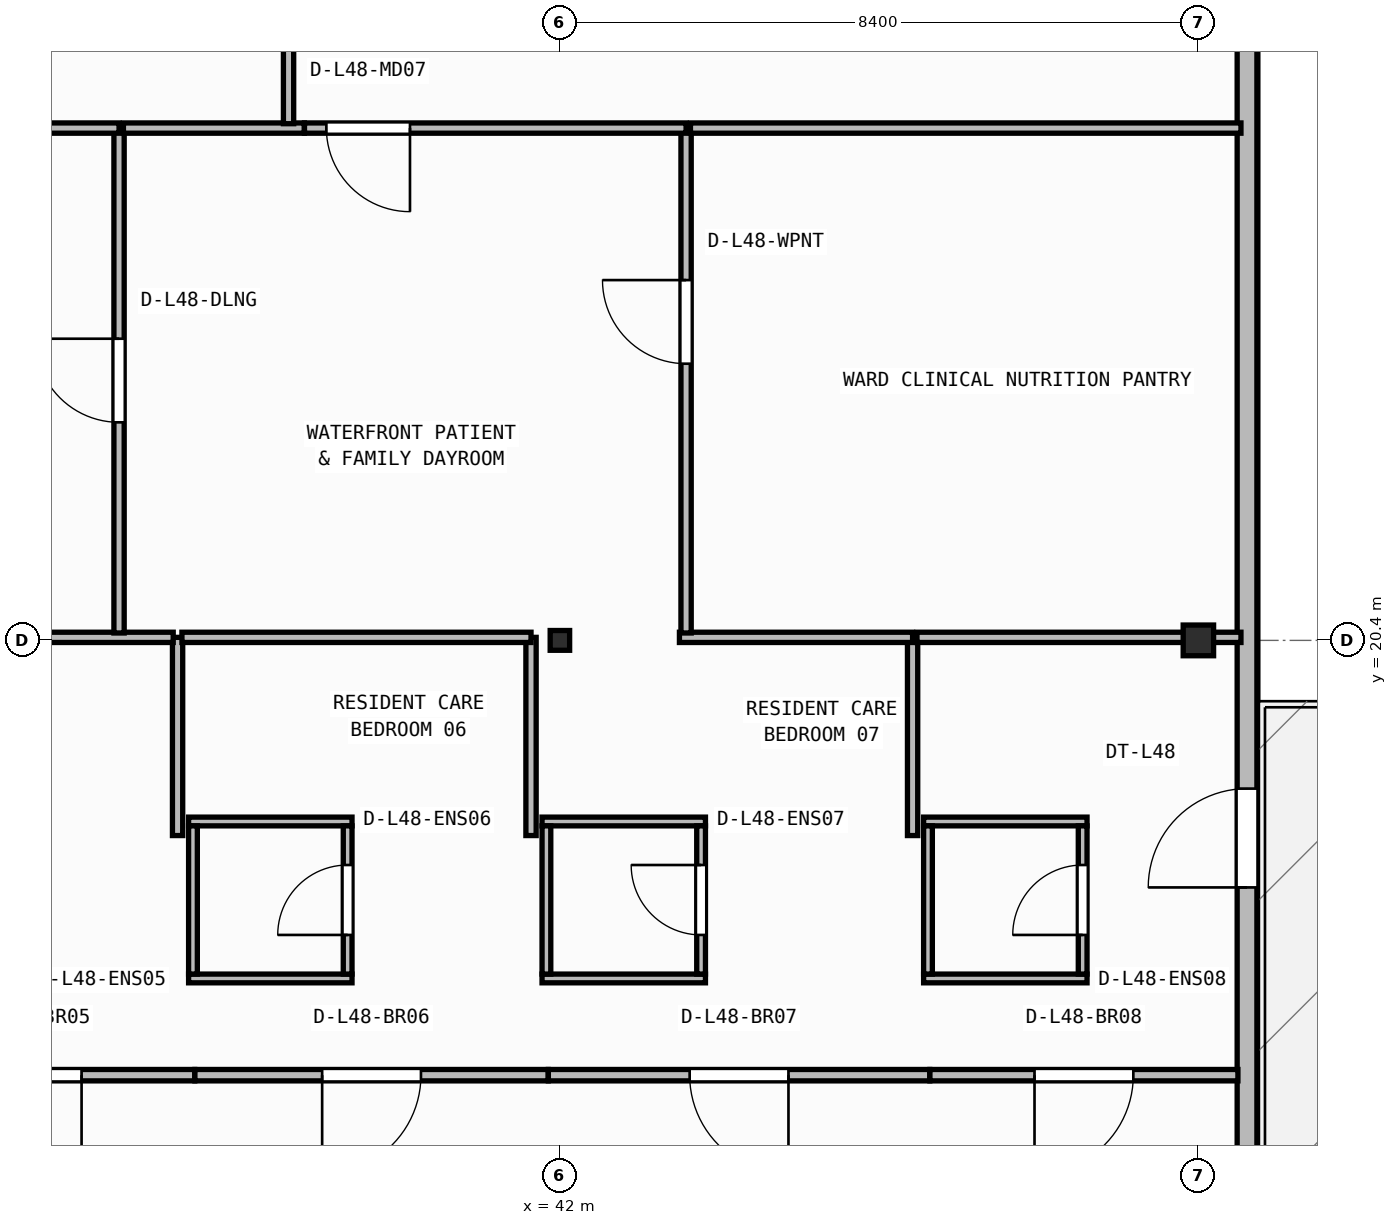
"""IFC4 building model, lengths in metres.
Left out: names, types, materials, properties, quantities, classifications, styles, units other than length and angle.
Written with IfcOpenShell. Run it as: python <this file> out.ifc"""

import sys

from ifc_helpers import new_model, si_unit, direction, frame, frame_2d, origin, origin_2d, place, context, subcontext, project, spatial, rectangle, i_section, extrude, element, fill, save


model = new_model("IFC4")
c1 = context("Model", 3, precision=1e-05, world=origin(), true_north=direction((0.0, 1.0)))
c2 = subcontext(c1, "Body", "Model", "MODEL_VIEW")
j1 = project(units=[si_unit("LENGTHUNIT", "METRE"), si_unit("PLANEANGLEUNIT", "RADIAN")], contexts=[c1])
p1 = place(None, origin())
s1 = spatial("IfcSite", under=j1, at=p1, CompositionType="ELEMENT")
p2 = place(p1, origin())
s2 = spatial("IfcBuilding", under=s1, at=p2, CompositionType="ELEMENT")
p3 = place(p2, frame((0.0, 0.0, 196.05)))
s3 = spatial("IfcBuildingStorey", under=s2, at=p3, CompositionType="ELEMENT", Elevation=196.05)
p4 = place(p3, frame((42.0, 20.4, 0.0), z_axis=(0.0, 0.0, 1.0), x_axis=(1.0, 0.0, 0.0)))
e1 = element("IfcColumn", 1, at=p4, inside=s3, PredefinedType="COLUMN", context=c2, shape_type="SweptSolid", body=[
    extrude(i_section(OverallWidth=0.256, OverallDepth=0.26, WebThickness=0.01, FlangeThickness=0.017, FilletRadius=0.013, at=origin_2d()), origin(), (0.0, 0.0, 1.0), 3.95),
])
p5 = place(p3, frame((50.4, 20.4, 0.0), z_axis=(0.0, 0.0, 1.0), x_axis=(1.0, 0.0, 0.0)))
e2 = element("IfcColumn", 2, at=p5, inside=s3, PredefinedType="COLUMN", context=c2, shape_type="SweptSolid", body=[
    extrude(i_section(OverallWidth=0.4, OverallDepth=0.404, WebThickness=0.02, FlangeThickness=0.032, at=origin_2d()), origin(), (0.0, 0.0, 1.0), 3.95),
])
p6 = place(p3, frame((51.04, 6.46, 0.0), z_axis=(0.0, 0.0, 1.0), x_axis=(0.0, 1.0, 0.0)))
e3 = element("IfcWall", 3, at=p6, inside=s3, PredefinedType="STANDARD", context=c2, shape_type="SweptSolid", body=[
    extrude(rectangle(XDim=22.68, YDim=0.26, at=frame_2d((11.34, 0.0))), origin(), (0.0, 0.0, 1.0), 3.71),
])
p7 = place(p6, frame((10.69, 0.0, 0.0)))
e4 = element("IfcOpeningElement", 4, at=p7, cuts=e3, PredefinedType="OPENING", context=c2, shape_type="SweptSolid", body=[
    extrude(rectangle(XDim=1.3, YDim=2.15, at=frame_2d((0.65, 1.075))), frame((0.0, 0.14, 0.0), z_axis=(0.0, -1.0, 0.0), x_axis=(1.0, 0.0, 0.0)), (0.0, 0.0, 1.0), 0.28),
])
p8 = place(p3, frame((37.115, 15.952, 0.0), z_axis=(0.0, 0.0, 1.0), x_axis=(1.0, 0.0, 0.0)))
e5 = element("IfcWall", 5, at=p8, inside=s3, PredefinedType="PARTITIONING", context=c2, shape_type="SweptSolid", body=[
    extrude(rectangle(XDim=2.15, YDim=0.115, at=frame_2d((1.075, 0.0))), origin(), (0.0, 0.0, 1.0), 3.478),
])
p9 = place(p3, frame((37.115, 18.018, 0.0), z_axis=(0.0, 0.0, 1.0), x_axis=(1.0, 0.0, 0.0)))
e6 = element("IfcWall", 6, at=p9, inside=s3, PredefinedType="PARTITIONING", context=c2, shape_type="SweptSolid", body=[
    extrude(rectangle(XDim=2.15, YDim=0.115, at=frame_2d((1.075, 0.0))), origin(), (0.0, 0.0, 1.0), 3.71),
])
p10 = place(p3, frame((37.173, 16.01, 0.0), z_axis=(0.0, 0.0, 1.0), x_axis=(0.0, 1.0, 0.0)))
e7 = element("IfcWall", 7, at=p10, inside=s3, PredefinedType="PARTITIONING", context=c2, shape_type="SweptSolid", body=[
    extrude(rectangle(XDim=1.95, YDim=0.115, at=frame_2d((0.975, 0.0))), origin(), (0.0, 0.0, 1.0), 3.71),
])
p11 = place(p3, frame((39.208, 16.01, 0.0), z_axis=(0.0, 0.0, 1.0), x_axis=(0.0, 1.0, 0.0)))
e8 = element("IfcWall", 8, at=p11, inside=s3, PredefinedType="PARTITIONING", context=c2, shape_type="SweptSolid", body=[
    extrude(rectangle(XDim=1.95, YDim=0.115, at=frame_2d((0.975, 0.0))), origin(), (0.0, 0.0, 1.0), 3.71),
])
p12 = place(p11, frame((0.515, 0.0, 0.0)))
e9 = element("IfcOpeningElement", 9, at=p12, cuts=e8, PredefinedType="OPENING", context=c2, shape_type="SweptSolid", body=[
    extrude(rectangle(XDim=0.92, YDim=2.1, at=frame_2d((0.46, 1.05))), frame((0.0, 0.067, 0.0), z_axis=(0.0, -1.0, 0.0), x_axis=(1.0, 0.0, 0.0)), (0.0, 0.0, 1.0), 0.135),
])
p13 = place(p3, frame((41.765, 15.952, 0.0), z_axis=(0.0, 0.0, 1.0), x_axis=(1.0, 0.0, 0.0)))
e10 = element("IfcWall", 10, at=p13, inside=s3, PredefinedType="PARTITIONING", context=c2, shape_type="SweptSolid", body=[
    extrude(rectangle(XDim=2.15, YDim=0.115, at=frame_2d((1.075, 0.0))), origin(), (0.0, 0.0, 1.0), 3.478),
])
p14 = place(p3, frame((41.765, 18.018, 0.0), z_axis=(0.0, 0.0, 1.0), x_axis=(1.0, 0.0, 0.0)))
e11 = element("IfcWall", 11, at=p14, inside=s3, PredefinedType="PARTITIONING", context=c2, shape_type="SweptSolid", body=[
    extrude(rectangle(XDim=2.15, YDim=0.115, at=frame_2d((1.075, 0.0))), origin(), (0.0, 0.0, 1.0), 3.71),
])
p15 = place(p3, frame((41.823, 16.01, 0.0), z_axis=(0.0, 0.0, 1.0), x_axis=(0.0, 1.0, 0.0)))
e12 = element("IfcWall", 12, at=p15, inside=s3, PredefinedType="PARTITIONING", context=c2, shape_type="SweptSolid", body=[
    extrude(rectangle(XDim=1.95, YDim=0.115, at=frame_2d((0.975, 0.0))), origin(), (0.0, 0.0, 1.0), 3.152),
])
p16 = place(p3, frame((43.857, 16.01, 0.0), z_axis=(0.0, 0.0, 1.0), x_axis=(0.0, 1.0, 0.0)))
e13 = element("IfcWall", 13, at=p16, inside=s3, PredefinedType="PARTITIONING", context=c2, shape_type="SweptSolid", body=[
    extrude(rectangle(XDim=1.95, YDim=0.115, at=frame_2d((0.975, 0.0))), origin(), (0.0, 0.0, 1.0), 3.71),
])
p17 = place(p16, frame((0.515, 0.0, 0.0)))
e14 = element("IfcOpeningElement", 14, at=p17, cuts=e13, PredefinedType="OPENING", context=c2, shape_type="SweptSolid", body=[
    extrude(rectangle(XDim=0.92, YDim=2.1, at=frame_2d((0.46, 1.05))), frame((0.0, 0.067, 0.0), z_axis=(0.0, -1.0, 0.0), x_axis=(1.0, 0.0, 0.0)), (0.0, 0.0, 1.0), 0.135),
])
p18 = place(p3, frame((46.785, 15.952, 0.0), z_axis=(0.0, 0.0, 1.0), x_axis=(1.0, 0.0, 0.0)))
e15 = element("IfcWall", 15, at=p18, inside=s3, PredefinedType="PARTITIONING", context=c2, shape_type="SweptSolid", body=[
    extrude(rectangle(XDim=2.15, YDim=0.115, at=frame_2d((1.075, 0.0))), origin(), (0.0, 0.0, 1.0), 3.478),
])
p19 = place(p3, frame((46.785, 18.018, 0.0), z_axis=(0.0, 0.0, 1.0), x_axis=(1.0, 0.0, 0.0)))
e16 = element("IfcWall", 16, at=p19, inside=s3, PredefinedType="PARTITIONING", context=c2, shape_type="SweptSolid", body=[
    extrude(rectangle(XDim=2.15, YDim=0.115, at=frame_2d((1.075, 0.0))), origin(), (0.0, 0.0, 1.0), 3.71),
])
p20 = place(p3, frame((46.843, 16.01, 0.0), z_axis=(0.0, 0.0, 1.0), x_axis=(0.0, 1.0, 0.0)))
e17 = element("IfcWall", 17, at=p20, inside=s3, PredefinedType="PARTITIONING", context=c2, shape_type="SweptSolid", body=[
    extrude(rectangle(XDim=1.95, YDim=0.115, at=frame_2d((0.975, 0.0))), origin(), (0.0, 0.0, 1.0), 3.71),
])
p21 = place(p3, frame((48.877, 16.01, 0.0), z_axis=(0.0, 0.0, 1.0), x_axis=(0.0, 1.0, 0.0)))
e18 = element("IfcWall", 18, at=p21, inside=s3, PredefinedType="PARTITIONING", context=c2, shape_type="SweptSolid", body=[
    extrude(rectangle(XDim=1.95, YDim=0.115, at=frame_2d((0.975, 0.0))), origin(), (0.0, 0.0, 1.0), 3.71),
])
p22 = place(p21, frame((0.515, 0.0, 0.0)))
e19 = element("IfcOpeningElement", 19, at=p22, cuts=e18, PredefinedType="OPENING", context=c2, shape_type="SweptSolid", body=[
    extrude(rectangle(XDim=0.92, YDim=2.1, at=frame_2d((0.46, 1.05))), frame((0.0, 0.067, 0.0), z_axis=(0.0, -1.0, 0.0), x_axis=(1.0, 0.0, 0.0)), (0.0, 0.0, 1.0), 0.135),
])
p23 = place(p3, frame((37.196, 14.68, 0.0), z_axis=(0.0, 0.0, 1.0), x_axis=(-1.0, 0.0, 0.0)))
e20 = element("IfcWall", 20, at=p23, inside=s3, PredefinedType="PARTITIONING", context=c2, shape_type="SweptSolid", body=[
    extrude(rectangle(XDim=4.278, YDim=0.15, at=frame_2d((2.139, 0.0))), origin(), (0.0, 0.0, 1.0), 3.71),
])
p24 = place(p23, frame((1.489, 0.0, 0.0)))
e21 = element("IfcOpeningElement", 21, at=p24, cuts=e20, PredefinedType="OPENING", context=c2, shape_type="SweptSolid", body=[
    extrude(rectangle(XDim=1.3, YDim=2.15, at=frame_2d((0.65, 1.075))), frame((0.0, 0.085, 0.0), z_axis=(0.0, -1.0, 0.0), x_axis=(1.0, 0.0, 0.0)), (0.0, 0.0, 1.0), 0.17),
])
p25 = place(p3, frame((41.846, 14.68, 0.0), z_axis=(0.0, 0.0, 1.0), x_axis=(-1.0, 0.0, 0.0)))
e22 = element("IfcWall", 22, at=p25, inside=s3, PredefinedType="PARTITIONING", context=c2, shape_type="SweptSolid", body=[
    extrude(rectangle(XDim=4.648, YDim=0.15, at=frame_2d((2.324, 0.0))), origin(), (0.0, 0.0, 1.0), 3.71),
])
p26 = place(p25, frame((1.674, 0.0, 0.0)))
e23 = element("IfcOpeningElement", 23, at=p26, cuts=e22, PredefinedType="OPENING", context=c2, shape_type="SweptSolid", body=[
    extrude(rectangle(XDim=1.3, YDim=2.15, at=frame_2d((0.65, 1.075))), frame((0.0, 0.085, 0.0), z_axis=(0.0, -1.0, 0.0), x_axis=(1.0, 0.0, 0.0)), (0.0, 0.0, 1.0), 0.17),
])
p27 = place(p3, frame((46.866, 14.68, 0.0), z_axis=(0.0, 0.0, 1.0), x_axis=(-1.0, 0.0, 0.0)))
e24 = element("IfcWall", 24, at=p27, inside=s3, PredefinedType="PARTITIONING", context=c2, shape_type="SweptSolid", body=[
    extrude(rectangle(XDim=5.018, YDim=0.15, at=frame_2d((2.509, 0.0))), origin(), (0.0, 0.0, 1.0), 3.71),
])
p28 = place(p27, frame((1.859, 0.0, 0.0)))
e25 = element("IfcOpeningElement", 25, at=p28, cuts=e24, PredefinedType="OPENING", context=c2, shape_type="SweptSolid", body=[
    extrude(rectangle(XDim=1.3, YDim=2.15, at=frame_2d((0.65, 1.075))), frame((0.0, 0.085, 0.0), z_axis=(0.0, -1.0, 0.0), x_axis=(1.0, 0.0, 0.0)), (0.0, 0.0, 1.0), 0.17),
])
p29 = place(p3, frame((50.92, 14.68, 0.0), z_axis=(0.0, 0.0, 1.0), x_axis=(-1.0, 0.0, 0.0)))
e26 = element("IfcWall", 26, at=p29, inside=s3, PredefinedType="PARTITIONING", context=c2, shape_type="SweptSolid", body=[
    extrude(rectangle(XDim=4.052, YDim=0.15, at=frame_2d((2.026, 0.0))), origin(), (0.0, 0.0, 1.0), 3.71),
])
p30 = place(p29, frame((1.376, 0.0, 0.0)))
e27 = element("IfcOpeningElement", 27, at=p30, cuts=e26, PredefinedType="OPENING", context=c2, shape_type="SweptSolid", body=[
    extrude(rectangle(XDim=1.3, YDim=2.15, at=frame_2d((0.65, 1.075))), frame((0.0, 0.085, 0.0), z_axis=(0.0, -1.0, 0.0), x_axis=(1.0, 0.0, 0.0)), (0.0, 0.0, 1.0), 0.17),
])
p31 = place(p3, frame((36.97, 17.833, 0.0), z_axis=(0.0, 0.0, 1.0), x_axis=(0.0, 1.0, 0.0)))
e28 = element("IfcWall", 28, at=p31, inside=s3, PredefinedType="PARTITIONING", context=c2, shape_type="SweptSolid", body=[
    extrude(rectangle(XDim=2.607, YDim=0.135, at=frame_2d((1.304, 0.0))), origin(), (0.0, 0.0, 1.0), 3.71),
])
p32 = place(p3, frame((36.913, 20.44, 0.0), z_axis=(0.0, 0.0, 1.0), x_axis=(-1.0, 0.0, 0.0)))
e29 = element("IfcWall", 29, at=p32, inside=s3, PredefinedType="PARTITIONING", context=c2, shape_type="SweptSolid", body=[
    extrude(rectangle(XDim=4.165, YDim=0.135, at=frame_2d((2.083, 0.0))), origin(), (0.0, 0.0, 1.0), 3.152),
])
p33 = place(p3, frame((41.62, 17.833, 0.0), z_axis=(0.0, 0.0, 1.0), x_axis=(0.0, 1.0, 0.0)))
e30 = element("IfcWall", 30, at=p33, inside=s3, PredefinedType="PARTITIONING", context=c2, shape_type="SweptSolid", body=[
    extrude(rectangle(XDim=2.607, YDim=0.135, at=frame_2d((1.304, 0.0))), origin(), (0.0, 0.0, 1.0), 3.152),
])
p34 = place(p3, frame((41.62, 20.44, 0.0), z_axis=(0.0, 0.0, 1.0), x_axis=(-1.0, 0.0, 0.0)))
e31 = element("IfcWall", 31, at=p34, inside=s3, PredefinedType="PARTITIONING", context=c2, shape_type="SweptSolid", body=[
    extrude(rectangle(XDim=4.593, YDim=0.135, at=frame_2d((2.296, 0.0))), origin(), (0.0, 0.0, 1.0), 3.152),
])
p35 = place(p3, frame((46.64, 17.833, 0.0), z_axis=(0.0, 0.0, 1.0), x_axis=(0.0, 1.0, 0.0)))
e32 = element("IfcWall", 32, at=p35, inside=s3, PredefinedType="PARTITIONING", context=c2, shape_type="SweptSolid", body=[
    extrude(rectangle(XDim=2.607, YDim=0.135, at=frame_2d((1.304, 0.0))), origin(), (0.0, 0.0, 1.0), 3.71),
])
p36 = place(p3, frame((46.64, 20.44, 0.0), z_axis=(0.0, 0.0, 1.0), x_axis=(-1.0, 0.0, 0.0)))
e33 = element("IfcWall", 33, at=p36, inside=s3, PredefinedType="PARTITIONING", context=c2, shape_type="SweptSolid", body=[
    extrude(rectangle(XDim=3.067, YDim=0.135, at=frame_2d((1.534, 0.0))), origin(), (0.0, 0.0, 1.0), 3.152),
])
p37 = place(p3, frame((50.96, 20.44, 0.0), z_axis=(0.0, 0.0, 1.0), x_axis=(-1.0, 0.0, 0.0)))
e34 = element("IfcWall", 34, at=p37, inside=s3, PredefinedType="PARTITIONING", context=c2, shape_type="SweptSolid", body=[
    extrude(rectangle(XDim=4.262, YDim=0.135, at=frame_2d((2.131, 0.0))), origin(), (0.0, 0.0, 1.0), 3.152),
])
p38 = place(p3, frame((36.2, 20.498, 0.0), z_axis=(0.0, 0.0, 1.0), x_axis=(0.0, 1.0, 0.0)))
e35 = element("IfcWall", 35, at=p38, inside=s3, PredefinedType="PARTITIONING", context=c2, shape_type="SweptSolid", body=[
    extrude(rectangle(XDim=6.642, YDim=0.135, at=frame_2d((3.321, 0.0))), origin(), (0.0, 0.0, 1.0), 3.71),
])
p39 = place(p38, frame((2.771, 0.0, 0.0)))
e36 = element("IfcOpeningElement", 36, at=p39, cuts=e35, PredefinedType="OPENING", context=c2, shape_type="SweptSolid", body=[
    extrude(rectangle(XDim=1.1, YDim=2.1, at=frame_2d((0.55, 1.05))), frame((0.0, 0.077, 0.0), z_axis=(0.0, -1.0, 0.0), x_axis=(1.0, 0.0, 0.0)), (0.0, 0.0, 1.0), 0.155),
])
p40 = place(p3, frame((36.2, 27.14, 0.0), z_axis=(0.0, 0.0, 1.0), x_axis=(-1.0, 0.0, 0.0)))
e37 = element("IfcWall", 37, at=p40, inside=s3, PredefinedType="PARTITIONING", context=c2, shape_type="SweptSolid", body=[
    extrude(rectangle(XDim=19.68, YDim=0.135, at=frame_2d((9.84, 0.0))), origin(), (0.0, 0.0, 1.0), 3.71),
])
p41 = place(p40, frame((14.744, 0.0, 0.0)))
e38 = element("IfcOpeningElement", 38, at=p41, cuts=e37, PredefinedType="OPENING", context=c2, shape_type="SweptSolid", body=[
    extrude(rectangle(XDim=1.1, YDim=2.1, at=frame_2d((0.55, 1.05))), frame((0.0, 0.077, 0.0), z_axis=(0.0, -1.0, 0.0), x_axis=(1.0, 0.0, 0.0)), (0.0, 0.0, 1.0), 0.155),
])
p42 = place(p3, frame((43.66, 20.498, 0.0), z_axis=(0.0, 0.0, 1.0), x_axis=(0.0, 1.0, 0.0)))
e39 = element("IfcWall", 39, at=p42, inside=s3, PredefinedType="PARTITIONING", context=c2, shape_type="SweptSolid", body=[
    extrude(rectangle(XDim=6.642, YDim=0.135, at=frame_2d((3.321, 0.0))), origin(), (0.0, 0.0, 1.0), 3.71),
])
p43 = place(p42, frame((3.542, 0.0, 0.0)))
e40 = element("IfcOpeningElement", 40, at=p43, cuts=e39, PredefinedType="OPENING", context=c2, shape_type="SweptSolid", body=[
    extrude(rectangle(XDim=1.1, YDim=2.1, at=frame_2d((0.55, 1.05))), frame((0.0, 0.077, 0.0), z_axis=(0.0, -1.0, 0.0), x_axis=(1.0, 0.0, 0.0)), (0.0, 0.0, 1.0), 0.155),
])
p44 = place(p3, frame((38.637, 27.14, 0.0), z_axis=(0.0, 0.0, 1.0), x_axis=(-1.0, 0.0, 0.0)))
e41 = element("IfcWall", 41, at=p44, inside=s3, PredefinedType="PARTITIONING", context=c2, shape_type="SweptSolid", body=[
    extrude(rectangle(XDim=2.38, YDim=0.135, at=frame_2d((1.19, 0.0))), origin(), (0.0, 0.0, 1.0), 3.71),
])
p45 = place(p3, frame((43.66, 27.14, 0.0), z_axis=(0.0, 0.0, 1.0), x_axis=(-1.0, 0.0, 0.0)))
e42 = element("IfcWall", 42, at=p45, inside=s3, PredefinedType="PARTITIONING", context=c2, shape_type="SweptSolid", body=[
    extrude(rectangle(XDim=5.021, YDim=0.135, at=frame_2d((2.51, 0.0))), origin(), (0.0, 0.0, 1.0), 3.71),
])
p46 = place(p45, frame((3.633, 0.0, 0.0)))
e43 = element("IfcOpeningElement", 43, at=p46, cuts=e42, PredefinedType="OPENING", context=c2, shape_type="SweptSolid", body=[
    extrude(rectangle(XDim=1.1, YDim=2.1, at=frame_2d((0.55, 1.05))), frame((0.0, 0.077, 0.0), z_axis=(0.0, -1.0, 0.0), x_axis=(1.0, 0.0, 0.0)), (0.0, 0.0, 1.0), 0.155),
])
p47 = place(p3, frame((50.96, 27.14, 0.0), z_axis=(0.0, 0.0, 1.0), x_axis=(-1.0, 0.0, 0.0)))
e44 = element("IfcWall", 44, at=p47, inside=s3, PredefinedType="PARTITIONING", context=c2, shape_type="SweptSolid", body=[
    extrude(rectangle(XDim=7.242, YDim=0.135, at=frame_2d((3.621, 0.0))), origin(), (0.0, 0.0, 1.0), 3.71),
])
p48 = place(p3, frame((38.43, 27.198, 0.0), z_axis=(0.0, 0.0, 1.0), x_axis=(0.0, 1.0, 0.0)))
e45 = element("IfcWall", 45, at=p48, inside=s3, PredefinedType="PARTITIONING", context=c2, shape_type="SweptSolid", body=[
    extrude(rectangle(XDim=3.744, YDim=0.135, at=frame_2d((1.872, 0.0))), origin(), (0.0, 0.0, 1.0), 3.71),
])
p49 = place(p7, origin())
e46 = element("IfcDoor", 46, at=p49, inside=s3, OperationType="SINGLE_SWING_LEFT", PredefinedType="DOOR", context=c2, shape_type="SweptSolid", body=[
    extrude(rectangle(XDim=1.3, YDim=2.15, at=frame_2d((0.65, 1.075))), frame((0.0, 0.025, 0.0), z_axis=(0.0, -1.0, 0.0), x_axis=(1.0, 0.0, 0.0)), (0.0, 0.0, 1.0), 0.05),
])
fill(e4, e46)
p50 = place(p12, origin())
e47 = element("IfcDoor", 47, at=p50, inside=s3, OperationType="SINGLE_SWING_LEFT", PredefinedType="DOOR", context=c2, shape_type="SweptSolid", body=[
    extrude(rectangle(XDim=0.92, YDim=2.1, at=frame_2d((0.46, 1.05))), frame((0.0, 0.025, 0.0), z_axis=(0.0, -1.0, 0.0), x_axis=(1.0, 0.0, 0.0)), (0.0, 0.0, 1.0), 0.05),
])
fill(e9, e47)
p51 = place(p17, origin())
e48 = element("IfcDoor", 48, at=p51, inside=s3, OperationType="SINGLE_SWING_RIGHT", PredefinedType="DOOR", context=c2, shape_type="SweptSolid", body=[
    extrude(rectangle(XDim=0.92, YDim=2.1, at=frame_2d((0.46, 1.05))), frame((0.0, 0.025, 0.0), z_axis=(0.0, -1.0, 0.0), x_axis=(1.0, 0.0, 0.0)), (0.0, 0.0, 1.0), 0.05),
])
fill(e14, e48)
p52 = place(p22, origin())
e49 = element("IfcDoor", 49, at=p52, inside=s3, OperationType="SINGLE_SWING_LEFT", PredefinedType="DOOR", context=c2, shape_type="SweptSolid", body=[
    extrude(rectangle(XDim=0.92, YDim=2.1, at=frame_2d((0.46, 1.05))), frame((0.0, 0.025, 0.0), z_axis=(0.0, -1.0, 0.0), x_axis=(1.0, 0.0, 0.0)), (0.0, 0.0, 1.0), 0.05),
])
fill(e19, e49)
p53 = place(p24, origin())
e50 = element("IfcDoor", 50, at=p53, inside=s3, OperationType="SINGLE_SWING_LEFT", PredefinedType="DOOR", context=c2, shape_type="SweptSolid", body=[
    extrude(rectangle(XDim=1.3, YDim=2.15, at=frame_2d((0.65, 1.075))), frame((0.0, 0.025, 0.0), z_axis=(0.0, -1.0, 0.0), x_axis=(1.0, 0.0, 0.0)), (0.0, 0.0, 1.0), 0.05),
])
fill(e21, e50)
p54 = place(p26, origin())
e51 = element("IfcDoor", 51, at=p54, inside=s3, OperationType="SINGLE_SWING_RIGHT", PredefinedType="DOOR", context=c2, shape_type="SweptSolid", body=[
    extrude(rectangle(XDim=1.3, YDim=2.15, at=frame_2d((0.65, 1.075))), frame((0.0, 0.025, 0.0), z_axis=(0.0, -1.0, 0.0), x_axis=(1.0, 0.0, 0.0)), (0.0, 0.0, 1.0), 0.05),
])
fill(e23, e51)
p55 = place(p28, origin())
e52 = element("IfcDoor", 52, at=p55, inside=s3, OperationType="SINGLE_SWING_LEFT", PredefinedType="DOOR", context=c2, shape_type="SweptSolid", body=[
    extrude(rectangle(XDim=1.3, YDim=2.15, at=frame_2d((0.65, 1.075))), frame((0.0, 0.025, 0.0), z_axis=(0.0, -1.0, 0.0), x_axis=(1.0, 0.0, 0.0)), (0.0, 0.0, 1.0), 0.05),
])
fill(e25, e52)
p56 = place(p30, origin())
e53 = element("IfcDoor", 53, at=p56, inside=s3, OperationType="SINGLE_SWING_RIGHT", PredefinedType="DOOR", context=c2, shape_type="SweptSolid", body=[
    extrude(rectangle(XDim=1.3, YDim=2.15, at=frame_2d((0.65, 1.075))), frame((0.0, 0.025, 0.0), z_axis=(0.0, -1.0, 0.0), x_axis=(1.0, 0.0, 0.0)), (0.0, 0.0, 1.0), 0.05),
])
fill(e27, e53)
p57 = place(p39, origin())
e54 = element("IfcDoor", 54, at=p57, inside=s3, OperationType="SINGLE_SWING_RIGHT", PredefinedType="DOOR", context=c2, shape_type="SweptSolid", body=[
    extrude(rectangle(XDim=1.1, YDim=2.1, at=frame_2d((0.55, 1.05))), frame((0.0, 0.025, 0.0), z_axis=(0.0, -1.0, 0.0), x_axis=(1.0, 0.0, 0.0)), (0.0, 0.0, 1.0), 0.05),
])
fill(e36, e54)
p58 = place(p43, origin())
e55 = element("IfcDoor", 55, at=p58, inside=s3, OperationType="SINGLE_SWING_RIGHT", PredefinedType="DOOR", context=c2, shape_type="SweptSolid", body=[
    extrude(rectangle(XDim=1.1, YDim=2.1, at=frame_2d((0.55, 1.05))), frame((0.0, 0.025, 0.0), z_axis=(0.0, -1.0, 0.0), x_axis=(1.0, 0.0, 0.0)), (0.0, 0.0, 1.0), 0.05),
])
fill(e40, e55)
p59 = place(p46, origin())
e56 = element("IfcDoor", 56, at=p59, inside=s3, OperationType="SINGLE_SWING_LEFT", PredefinedType="DOOR", context=c2, shape_type="SweptSolid", body=[
    extrude(rectangle(XDim=1.1, YDim=2.1, at=frame_2d((0.55, 1.05))), frame((0.0, 0.025, 0.0), z_axis=(0.0, -1.0, 0.0), x_axis=(1.0, 0.0, 0.0)), (0.0, 0.0, 1.0), 0.05),
])
fill(e43, e56)
save(model, sys.argv[1])
